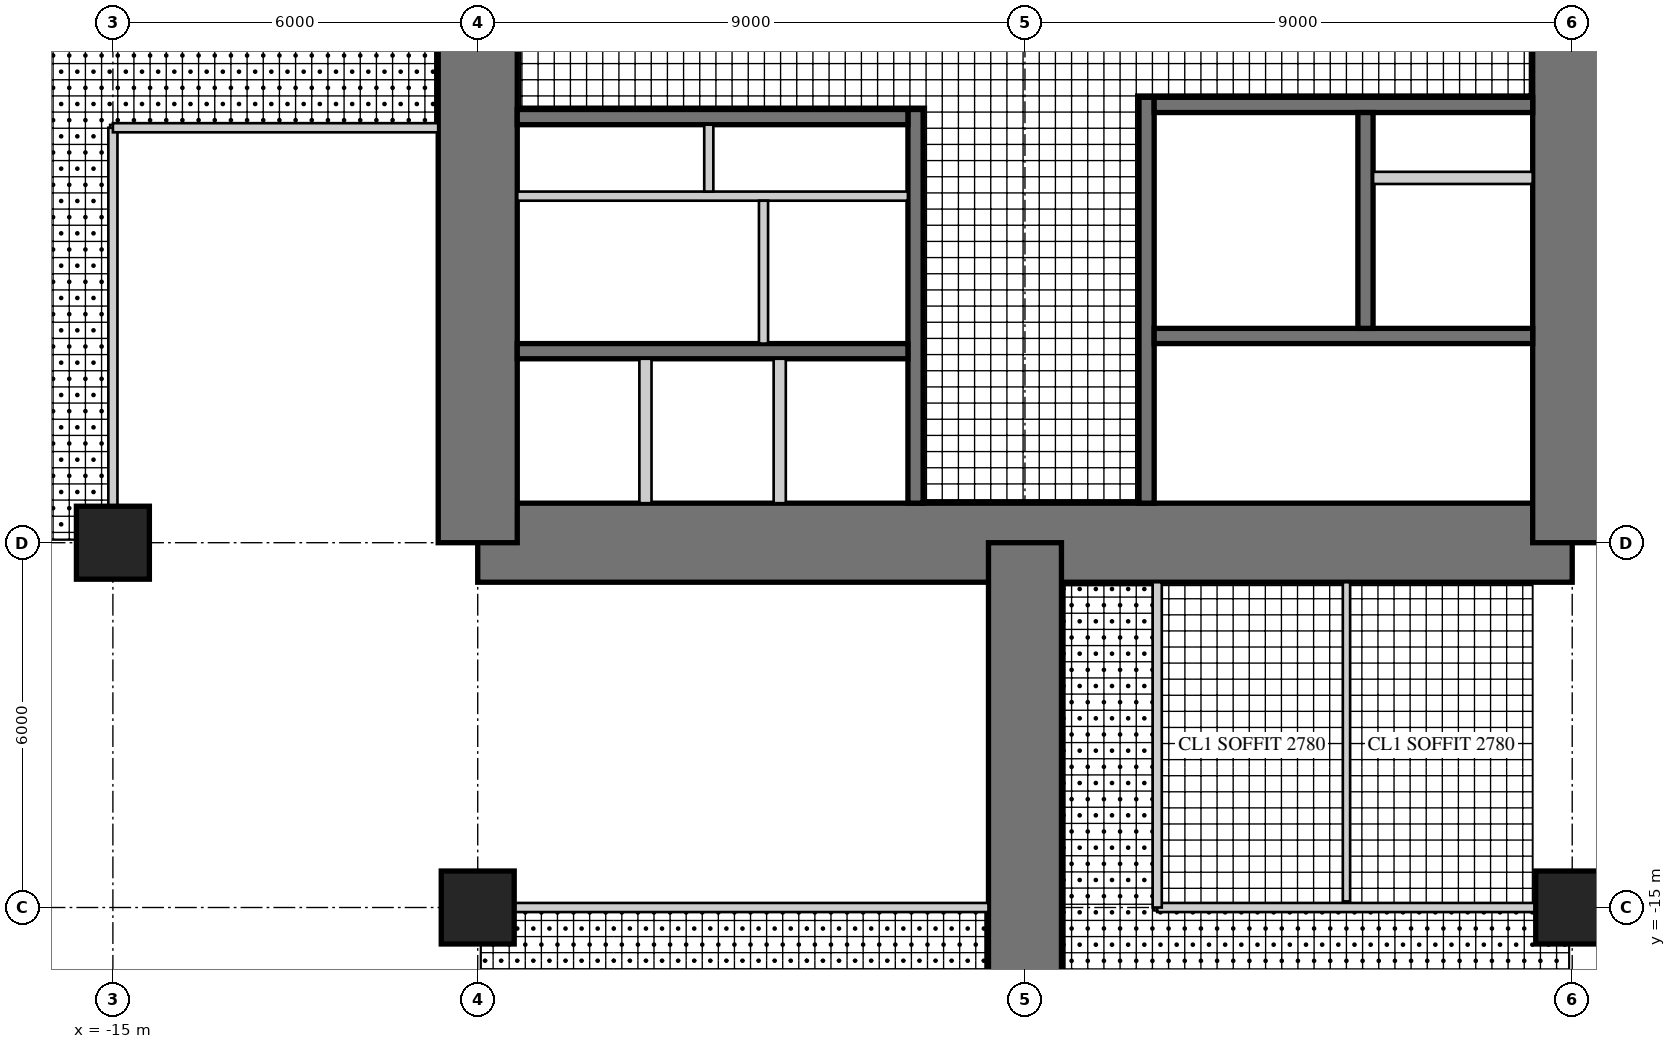
"""IFC4 building model, lengths in metres.
Left out: names, types, materials, properties, quantities, classifications, styles, units other than length and angle.
Written with IfcOpenShell. Run it as: python <this file> out.ifc"""

import sys

from ifc_helpers import new_model, si_unit, direction, frame, frame_2d, origin, origin_2d, place, context, subcontext, project, spatial, rectangle, extrude, element, fill, save


model = new_model("IFC4")
c1 = context("Model", 3, precision=1e-05, world=origin(), true_north=direction((0.0, 1.0)))
c2 = subcontext(c1, "Body", "Model", "MODEL_VIEW")
j1 = project(units=[si_unit("LENGTHUNIT", "METRE"), si_unit("PLANEANGLEUNIT", "RADIAN")], contexts=[c1])
p1 = place(None, origin())
s1 = spatial("IfcSite", under=j1, at=p1, CompositionType="ELEMENT")
p2 = place(p1, origin())
s2 = spatial("IfcBuilding", under=s1, at=p2, CompositionType="ELEMENT")
p3 = place(p2, frame((0.0, 0.0, 71.5)))
s3 = spatial("IfcBuildingStorey", under=s2, at=p3, CompositionType="ELEMENT", Elevation=71.5)
p4 = place(p3, frame((-9.0, -9.0, 0.0), z_axis=(0.0, 0.0, 1.0), x_axis=(1.0, 0.0, 0.0)))
e1 = element("IfcWall", 1, at=p4, inside=s3, PredefinedType="SHEAR", context=c2, shape_type="SweptSolid", body=[
    extrude(rectangle(XDim=18.0, YDim=1.3, at=frame_2d((9.0, 0.0))), origin(), (0.0, 0.0, 1.0), 4.0),
])
p5 = place(p4, frame((9.8, 0.0, 0.0)))
e2 = element("IfcOpeningElement", 2, at=p5, cuts=e1, PredefinedType="OPENING", context=c2, shape_type="SweptSolid", body=[
    extrude(rectangle(XDim=1.0, YDim=2.4, at=frame_2d((0.5, 1.2))), frame((0.0, 0.66, 0.0), z_axis=(0.0, -1.0, 0.0), x_axis=(1.0, 0.0, 0.0)), (0.0, 0.0, 1.0), 1.32),
])
p6 = place(p3, frame((9.0, -9.0, 0.0), z_axis=(0.0, 0.0, 1.0), x_axis=(0.0, 1.0, 0.0)))
e3 = element("IfcWall", 3, at=p6, inside=s3, PredefinedType="SHEAR", context=c2, shape_type="SweptSolid", body=[
    extrude(rectangle(XDim=18.0, YDim=1.3, at=frame_2d((9.0, 0.0))), origin(), (0.0, 0.0, 1.0), 4.0),
])
p7 = place(p6, frame((9.8, 0.0, 0.0)))
e4 = element("IfcOpeningElement", 4, at=p7, cuts=e3, PredefinedType="OPENING", context=c2, shape_type="SweptSolid", body=[
    extrude(rectangle(XDim=1.0, YDim=2.4, at=frame_2d((0.5, 1.2))), frame((0.0, 0.66, 0.0), z_axis=(0.0, -1.0, 0.0), x_axis=(1.0, 0.0, 0.0)), (0.0, 0.0, 1.0), 1.32),
])
p8 = place(p3, frame((-9.0, 9.0, 0.0), z_axis=(0.0, 0.0, 1.0), x_axis=(0.0, -1.0, 0.0)))
e5 = element("IfcWall", 5, at=p8, inside=s3, PredefinedType="SHEAR", context=c2, shape_type="SweptSolid", body=[
    extrude(rectangle(XDim=18.0, YDim=1.3, at=frame_2d((9.0, 0.0))), origin(), (0.0, 0.0, 1.0), 4.0),
])
p9 = place(p8, frame((9.8, 0.0, 0.0)))
e6 = element("IfcOpeningElement", 6, at=p9, cuts=e5, PredefinedType="OPENING", context=c2, shape_type="SweptSolid", body=[
    extrude(rectangle(XDim=1.0, YDim=2.4, at=frame_2d((0.5, 1.2))), frame((0.0, 0.66, 0.0), z_axis=(0.0, -1.0, 0.0), x_axis=(1.0, 0.0, 0.0)), (0.0, 0.0, 1.0), 1.32),
])
p10 = place(p3, frame((-1.8, -1.875, 0.0), z_axis=(0.0, 0.0, 1.0), x_axis=(0.0, -1.0, 0.0)))
e7 = element("IfcWall", 7, at=p10, inside=s3, PredefinedType="SHEAR", context=c2, shape_type="SweptSolid", body=[
    extrude(rectangle(XDim=6.475, YDim=0.25, at=frame_2d((3.238, 0.0))), origin(), (0.0, 0.0, 1.0), 4.0),
])
p11 = place(p10, frame((1.875, 0.0, 0.0)))
e8 = element("IfcOpeningElement", 8, at=p11, cuts=e7, PredefinedType="OPENING", context=c2, shape_type="SweptSolid", body=[
    extrude(rectangle(XDim=1.6, YDim=2.4, at=frame_2d((0.8, 1.2))), frame((0.0, 0.135, 0.0), z_axis=(0.0, -1.0, 0.0), x_axis=(1.0, 0.0, 0.0)), (0.0, 0.0, 1.0), 0.27),
])
for number, where, z_axis, x_axis in (
    (9, (-1.925, -2.0, 0.0), (0.0, 0.0, 1.0), (-1.0, 0.0, 0.0)),
    (10, (-1.925, -5.85, 0.0), (0.0, 0.0, 1.0), (-1.0, 0.0, 0.0)),
):
    element("IfcWall", number, at=place(p3, frame(where, z_axis=z_axis, x_axis=x_axis)), inside=s3, PredefinedType="SHEAR", context=c2, shape_type="SweptSolid", body=[
        extrude(rectangle(XDim=6.425, YDim=0.25, at=frame_2d((3.212, 0.0))), origin(), (0.0, 0.0, 1.0), 4.0),
    ])
p12 = place(p3, frame((-1.925, -3.3, 0.0), z_axis=(0.0, 0.0, 1.0), x_axis=(-1.0, 0.0, 0.0)))
e11 = element("IfcWall", 11, at=p12, inside=s3, PredefinedType="PARTITIONING", context=c2, shape_type="SweptSolid", body=[
    extrude(rectangle(XDim=6.425, YDim=0.15, at=frame_2d((3.212, 0.0))), origin(), (0.0, 0.0, 1.0), 4.0),
])
p13 = place(p12, frame((0.075, 0.0, 0.0)))
e12 = element("IfcOpeningElement", 12, at=p13, cuts=e11, PredefinedType="OPENING", context=c2, shape_type="SweptSolid", body=[
    extrude(rectangle(XDim=0.8, YDim=2.1, at=frame_2d((0.4, 1.05))), frame((0.0, 0.085, 0.0), z_axis=(0.0, -1.0, 0.0), x_axis=(1.0, 0.0, 0.0)), (0.0, 0.0, 1.0), 0.17),
])
p14 = place(p12, frame((3.675, 0.0, 0.0)))
e13 = element("IfcOpeningElement", 13, at=p14, cuts=e11, PredefinedType="OPENING", context=c2, shape_type="SweptSolid", body=[
    extrude(rectangle(XDim=0.8, YDim=2.1, at=frame_2d((0.4, 1.05))), frame((0.0, 0.085, 0.0), z_axis=(0.0, -1.0, 0.0), x_axis=(1.0, 0.0, 0.0)), (0.0, 0.0, 1.0), 0.17),
])
p15 = place(p3, frame((-5.2, -2.125, 0.0), z_axis=(0.0, 0.0, 1.0), x_axis=(0.0, -1.0, 0.0)))
e14 = element("IfcWall", 14, at=p15, inside=s3, PredefinedType="PARTITIONING", context=c2, shape_type="SweptSolid", body=[
    extrude(rectangle(XDim=1.1, YDim=0.15, at=frame_2d((0.55, 0.0))), origin(), (0.0, 0.0, 1.0), 4.0),
])
for number, where, z_axis, x_axis in (
    (15, (-4.033, -5.975, 0.0), (0.0, 0.0, 1.0), (0.0, -1.0, 0.0)),
    (16, (-6.242, -5.975, 0.0), (0.0, 0.0, 1.0), (0.0, -1.0, 0.0)),
):
    element("IfcWall", number, at=place(p3, frame(where, z_axis=z_axis, x_axis=x_axis)), inside=s3, PredefinedType="PARTITIONING", context=c2, shape_type="SweptSolid", body=[
        extrude(rectangle(XDim=2.375, YDim=0.2, at=frame_2d((1.188, 0.0))), origin(), (0.0, 0.0, 1.0), 4.0),
    ])
p16 = place(p3, frame((2.0, -1.675, 0.0), z_axis=(0.0, 0.0, 1.0), x_axis=(0.0, -1.0, 0.0)))
e17 = element("IfcWall", 17, at=p16, inside=s3, PredefinedType="SHEAR", context=c2, shape_type="SweptSolid", body=[
    extrude(rectangle(XDim=6.675, YDim=0.25, at=frame_2d((3.337, 0.0))), origin(), (0.0, 0.0, 1.0), 4.0),
])
p17 = place(p16, frame((0.725, 0.0, 0.0)))
e18 = element("IfcOpeningElement", 18, at=p17, cuts=e17, PredefinedType="OPENING", context=c2, shape_type="SweptSolid", body=[
    extrude(rectangle(XDim=1.0, YDim=2.1, at=frame_2d((0.5, 1.05))), frame((0.0, 0.135, 0.0), z_axis=(0.0, -1.0, 0.0), x_axis=(1.0, 0.0, 0.0)), (0.0, 0.0, 1.0), 0.27),
])
p18 = place(p3, frame((2.125, -1.8, 0.0), z_axis=(0.0, 0.0, 1.0), x_axis=(1.0, 0.0, 0.0)))
e19 = element("IfcWall", 19, at=p18, inside=s3, PredefinedType="SHEAR", context=c2, shape_type="SweptSolid", body=[
    extrude(rectangle(XDim=6.225, YDim=0.25, at=frame_2d((3.113, 0.0))), origin(), (0.0, 0.0, 1.0), 4.0),
])
p19 = place(p3, frame((2.125, -5.6, 0.0), z_axis=(0.0, 0.0, 1.0), x_axis=(1.0, 0.0, 0.0)))
e20 = element("IfcWall", 20, at=p19, inside=s3, PredefinedType="SHEAR", context=c2, shape_type="SweptSolid", body=[
    extrude(rectangle(XDim=6.225, YDim=0.25, at=frame_2d((3.113, 0.0))), origin(), (0.0, 0.0, 1.0), 4.0),
])
p20 = place(p19, frame((0.175, 0.0, 0.0)))
e21 = element("IfcOpeningElement", 21, at=p20, cuts=e20, PredefinedType="OPENING", context=c2, shape_type="SweptSolid", body=[
    extrude(rectangle(XDim=1.0, YDim=2.1, at=frame_2d((0.5, 1.05))), frame((0.0, 0.135, 0.0), z_axis=(0.0, -1.0, 0.0), x_axis=(1.0, 0.0, 0.0)), (0.0, 0.0, 1.0), 0.27),
])
p21 = place(p3, frame((5.6, -1.925, 0.0), z_axis=(0.0, 0.0, 1.0), x_axis=(0.0, -1.0, 0.0)))
e22 = element("IfcWall", 22, at=p21, inside=s3, PredefinedType="SHEAR", context=c2, shape_type="SweptSolid", body=[
    extrude(rectangle(XDim=3.55, YDim=0.25, at=frame_2d((1.775, 0.0))), origin(), (0.0, 0.0, 1.0), 4.0),
])
p22 = place(p21, frame((1.525, 0.0, 0.0)))
e23 = element("IfcOpeningElement", 23, at=p22, cuts=e22, PredefinedType="OPENING", context=c2, shape_type="SweptSolid", body=[
    extrude(rectangle(XDim=1.1, YDim=2.2, at=frame_2d((0.55, 1.1))), frame((0.0, 0.135, 0.0), z_axis=(0.0, -1.0, 0.0), x_axis=(1.0, 0.0, 0.0)), (0.0, 0.0, 1.0), 0.27),
])
p23 = place(p21, frame((0.075, 0.0, 0.0)))
e24 = element("IfcOpeningElement", 24, at=p23, cuts=e22, PredefinedType="OPENING", context=c2, shape_type="SweptSolid", body=[
    extrude(rectangle(XDim=0.8, YDim=2.1, at=frame_2d((0.4, 1.05))), frame((0.0, 0.135, 0.0), z_axis=(0.0, -1.0, 0.0), x_axis=(1.0, 0.0, 0.0)), (0.0, 0.0, 1.0), 0.27),
])
p24 = place(p3, frame((5.725, -3.0, 0.0), z_axis=(0.0, 0.0, 1.0), x_axis=(1.0, 0.0, 0.0)))
e25 = element("IfcWall", 25, at=p24, inside=s3, PredefinedType="PARTITIONING", context=c2, shape_type="SweptSolid", body=[
    extrude(rectangle(XDim=2.625, YDim=0.2, at=frame_2d((1.312, 0.0))), origin(), (0.0, 0.0, 1.0), 4.0),
])
p25 = place(p3, frame((0.0, -9.0, 0.0), z_axis=(0.0, 0.0, 1.0), x_axis=(0.0, -1.0, 0.0)))
e26 = element("IfcWall", 26, at=p25, inside=s3, PredefinedType="SHEAR", context=c2, shape_type="SweptSolid", body=[
    extrude(rectangle(XDim=18.0, YDim=1.2, at=frame_2d((9.0, 0.0))), origin(), (0.0, 0.0, 1.0), 4.0),
])
p26 = place(p25, frame((9.9, 0.0, 0.0)))
e27 = element("IfcOpeningElement", 27, at=p26, cuts=e26, PredefinedType="OPENING", context=c2, shape_type="SweptSolid", body=[
    extrude(rectangle(XDim=1.0, YDim=2.2, at=frame_2d((0.5, 1.1))), frame((0.0, 0.61, 0.0), z_axis=(0.0, -1.0, 0.0), x_axis=(1.0, 0.0, 0.0)), (0.0, 0.0, 1.0), 1.22),
])
for number, where, z_axis, x_axis in (
    (28, (-9.0, -15.0, 0.0), (0.0, 0.0, 1.0), (1.0, 0.0, 0.0)),
    (29, (9.0, -15.0, 0.0), (0.0, 0.0, 1.0), (1.0, 0.0, 0.0)),
    (30, (-15.0, -9.0, 0.0), (0.0, 0.0, 1.0), (1.0, 0.0, 0.0)),
):
    element("IfcColumn", number, at=place(p3, frame(where, z_axis=z_axis, x_axis=x_axis)), inside=s3, PredefinedType="COLUMN", context=c2, shape_type="SweptSolid", body=[
        extrude(rectangle(XDim=1.2, YDim=1.2, at=origin_2d()), origin(), (0.0, 0.0, 1.0), 4.0),
    ])
p27 = place(p3, frame((-4.3, -3.375, 0.0), z_axis=(0.0, 0.0, 1.0), x_axis=(0.0, -1.0, 0.0)))
e31 = element("IfcWall", 31, at=p27, inside=s3, PredefinedType="PARTITIONING", context=c2, shape_type="SweptSolid", body=[
    extrude(rectangle(XDim=2.35, YDim=0.15, at=frame_2d((1.175, 0.0))), origin(), (0.0, 0.0, 1.0), 3.8),
])
p28 = place(p27, frame((0.45, 0.0, 0.0)))
e32 = element("IfcOpeningElement", 32, at=p28, cuts=e31, PredefinedType="OPENING", context=c2, shape_type="SweptSolid", body=[
    extrude(rectangle(XDim=1.0, YDim=2.1, at=frame_2d((0.5, 1.05))), frame((0.0, 0.085, 0.0), z_axis=(0.0, -1.0, 0.0), x_axis=(1.0, 0.0, 0.0)), (0.0, 0.0, 1.0), 0.17),
])
p29 = place(p3, frame((2.175, -15.0, 0.0), z_axis=(0.0, 0.0, 1.0), x_axis=(1.0, 0.0, 0.0)))
e33 = element("IfcWall", 33, at=p29, inside=s3, PredefinedType="PARTITIONING", context=c2, shape_type="SweptSolid", body=[
    extrude(rectangle(XDim=6.225, YDim=0.15, at=frame_2d((3.112, 0.0))), origin(), (0.0, 0.0, 1.0), 2.95),
])
p30 = place(p29, frame((1.056, 0.0, 0.0)))
e34 = element("IfcOpeningElement", 34, at=p30, cuts=e33, PredefinedType="OPENING", context=c2, shape_type="SweptSolid", body=[
    extrude(rectangle(XDim=1.0, YDim=2.1, at=frame_2d((0.5, 1.05))), frame((0.0, 0.085, 0.0), z_axis=(0.0, -1.0, 0.0), x_axis=(1.0, 0.0, 0.0)), (0.0, 0.0, 1.0), 0.17),
])
p31 = place(p29, frame((4.169, 0.0, 0.0)))
e35 = element("IfcOpeningElement", 35, at=p31, cuts=e33, PredefinedType="OPENING", context=c2, shape_type="SweptSolid", body=[
    extrude(rectangle(XDim=1.0, YDim=2.1, at=frame_2d((0.5, 1.05))), frame((0.0, 0.085, 0.0), z_axis=(0.0, -1.0, 0.0), x_axis=(1.0, 0.0, 0.0)), (0.0, 0.0, 1.0), 0.17),
])
p32 = place(p3, frame((2.175, -9.65, 0.0), z_axis=(0.0, 0.0, 1.0), x_axis=(0.0, -1.0, 0.0)))
e36 = element("IfcWall", 36, at=p32, inside=s3, PredefinedType="PARTITIONING", context=c2, shape_type="SweptSolid", body=[
    extrude(rectangle(XDim=5.35, YDim=0.15, at=frame_2d((2.675, 0.0))), origin(), (0.0, 0.0, 1.0), 3.8),
])
p33 = place(p3, frame((5.288, -9.65, 0.0), z_axis=(0.0, 0.0, 1.0), x_axis=(0.0, -1.0, 0.0)))
e37 = element("IfcWall", 37, at=p33, inside=s3, PredefinedType="PLUMBINGWALL", context=c2, shape_type="SweptSolid", body=[
    extrude(rectangle(XDim=5.25, YDim=0.12, at=frame_2d((2.625, 0.0))), origin(), (0.0, 0.0, 1.0), 3.8),
])
p34 = place(p3, frame((-8.4, -15.0, 0.0), z_axis=(0.0, 0.0, 1.0), x_axis=(1.0, 0.0, 0.0)))
e38 = element("IfcWall", 38, at=p34, inside=s3, PredefinedType="PARTITIONING", context=c2, shape_type="SweptSolid", body=[
    extrude(rectangle(XDim=7.8, YDim=0.15, at=frame_2d((3.9, 0.0))), origin(), (0.0, 0.0, 1.0), 2.95),
])
p35 = place(p34, frame((3.4, 0.0, 0.0)))
e39 = element("IfcOpeningElement", 39, at=p35, cuts=e38, PredefinedType="OPENING", context=c2, shape_type="SweptSolid", body=[
    extrude(rectangle(XDim=1.0, YDim=2.1, at=frame_2d((0.5, 1.05))), frame((0.0, 0.085, 0.0), z_axis=(0.0, -1.0, 0.0), x_axis=(1.0, 0.0, 0.0)), (0.0, 0.0, 1.0), 0.17),
])
p36 = place(p3, frame((-15.0, -2.175, 0.0), z_axis=(0.0, 0.0, 1.0), x_axis=(0.0, -1.0, 0.0)))
e40 = element("IfcWall", 40, at=p36, inside=s3, PredefinedType="PARTITIONING", context=c2, shape_type="SweptSolid", body=[
    extrude(rectangle(XDim=6.225, YDim=0.15, at=frame_2d((3.112, 0.0))), origin(), (0.0, 0.0, 1.0), 2.95),
])
p37 = place(p36, frame((2.613, 0.0, 0.0)))
e41 = element("IfcOpeningElement", 41, at=p37, cuts=e40, PredefinedType="OPENING", context=c2, shape_type="SweptSolid", body=[
    extrude(rectangle(XDim=1.0, YDim=2.1, at=frame_2d((0.5, 1.05))), frame((0.0, 0.085, 0.0), z_axis=(0.0, -1.0, 0.0), x_axis=(1.0, 0.0, 0.0)), (0.0, 0.0, 1.0), 0.17),
])
p38 = place(p3, frame((-9.65, -2.175, 0.0), z_axis=(0.0, 0.0, 1.0), x_axis=(-1.0, 0.0, 0.0)))
e42 = element("IfcWall", 42, at=p38, inside=s3, PredefinedType="PARTITIONING", context=c2, shape_type="SweptSolid", body=[
    extrude(rectangle(XDim=5.35, YDim=0.15, at=frame_2d((2.675, 0.0))), origin(), (0.0, 0.0, 1.0), 3.8),
])
p39 = place(p28, origin())
e43 = element("IfcDoor", 43, at=p39, inside=s3, OperationType="SINGLE_SWING_LEFT", PredefinedType="DOOR", context=c2, shape_type="SweptSolid", body=[
    extrude(rectangle(XDim=1.0, YDim=2.1, at=frame_2d((0.5, 1.05))), frame((0.0, 0.025, 0.0), z_axis=(0.0, -1.0, 0.0), x_axis=(1.0, 0.0, 0.0)), (0.0, 0.0, 1.0), 0.05),
])
fill(e32, e43)
p40 = place(p30, origin())
e44 = element("IfcDoor", 44, at=p40, inside=s3, OperationType="SINGLE_SWING_LEFT", PredefinedType="DOOR", context=c2, shape_type="SweptSolid", body=[
    extrude(rectangle(XDim=1.0, YDim=2.1, at=frame_2d((0.5, 1.05))), frame((0.0, 0.025, 0.0), z_axis=(0.0, -1.0, 0.0), x_axis=(1.0, 0.0, 0.0)), (0.0, 0.0, 1.0), 0.05),
])
fill(e34, e44)
p41 = place(p31, origin())
e45 = element("IfcDoor", 45, at=p41, inside=s3, OperationType="SINGLE_SWING_LEFT", PredefinedType="DOOR", context=c2, shape_type="SweptSolid", body=[
    extrude(rectangle(XDim=1.0, YDim=2.1, at=frame_2d((0.5, 1.05))), frame((0.0, 0.025, 0.0), z_axis=(0.0, -1.0, 0.0), x_axis=(1.0, 0.0, 0.0)), (0.0, 0.0, 1.0), 0.05),
])
fill(e35, e45)
p42 = place(p35, origin())
e46 = element("IfcDoor", 46, at=p42, inside=s3, OperationType="SINGLE_SWING_RIGHT", PredefinedType="DOOR", context=c2, shape_type="SweptSolid", body=[
    extrude(rectangle(XDim=1.0, YDim=2.1, at=frame_2d((0.5, 1.05))), frame((0.0, 0.025, 0.0), z_axis=(0.0, -1.0, 0.0), x_axis=(1.0, 0.0, 0.0)), (0.0, 0.0, 1.0), 0.05),
])
fill(e39, e46)
p43 = place(p37, origin())
e47 = element("IfcDoor", 47, at=p43, inside=s3, OperationType="SINGLE_SWING_LEFT", PredefinedType="DOOR", context=c2, shape_type="SweptSolid", body=[
    extrude(rectangle(XDim=1.0, YDim=2.1, at=frame_2d((0.5, 1.05))), frame((0.0, 0.025, 0.0), z_axis=(0.0, -1.0, 0.0), x_axis=(1.0, 0.0, 0.0)), (0.0, 0.0, 1.0), 0.05),
])
fill(e41, e47)
p44 = place(p5, frame((1.0, 0.0, 0.0), z_axis=(0.0, 0.0, 1.0), x_axis=(-1.0, 0.0, 0.0)))
e48 = element("IfcDoor", 48, at=p44, inside=s3, OperationType="SINGLE_SWING_RIGHT", PredefinedType="DOOR", context=c2, shape_type="SweptSolid", body=[
    extrude(rectangle(XDim=1.0, YDim=2.4, at=frame_2d((0.5, 1.2))), frame((0.0, -0.005, 0.0), z_axis=(0.0, -1.0, 0.0), x_axis=(1.0, 0.0, 0.0)), (0.0, 0.0, 1.0), 0.05),
])
fill(e2, e48)
p45 = place(p9, frame((1.0, 0.0, 0.0), z_axis=(0.0, 0.0, 1.0), x_axis=(-1.0, 0.0, 0.0)))
e49 = element("IfcDoor", 49, at=p45, inside=s3, OperationType="SINGLE_SWING_RIGHT", PredefinedType="DOOR", context=c2, shape_type="SweptSolid", body=[
    extrude(rectangle(XDim=1.0, YDim=2.4, at=frame_2d((0.5, 1.2))), frame((0.0, -0.005, 0.0), z_axis=(0.0, -1.0, 0.0), x_axis=(1.0, 0.0, 0.0)), (0.0, 0.0, 1.0), 0.05),
])
fill(e6, e49)
p46 = place(p11, frame((1.6, 0.0, 0.0), z_axis=(0.0, 0.0, 1.0), x_axis=(-1.0, 0.0, 0.0)))
e50 = element("IfcDoor", 50, at=p46, inside=s3, OperationType="DOUBLE_DOOR_SINGLE_SWING", PredefinedType="DOOR", context=c2, shape_type="SweptSolid", body=[
    extrude(rectangle(XDim=1.6, YDim=2.4, at=frame_2d((0.8, 1.2))), frame((0.0, 0.025, 0.0), z_axis=(0.0, -1.0, 0.0), x_axis=(1.0, 0.0, 0.0)), (0.0, 0.0, 1.0), 0.05),
])
fill(e8, e50)
p47 = place(p13, frame((0.8, 0.0, 0.0), z_axis=(0.0, 0.0, 1.0), x_axis=(-1.0, 0.0, 0.0)))
e51 = element("IfcDoor", 51, at=p47, inside=s3, OperationType="SINGLE_SWING_RIGHT", PredefinedType="DOOR", context=c2, shape_type="SweptSolid", body=[
    extrude(rectangle(XDim=0.8, YDim=2.1, at=frame_2d((0.4, 1.05))), frame((0.0, 0.025, 0.0), z_axis=(0.0, -1.0, 0.0), x_axis=(1.0, 0.0, 0.0)), (0.0, 0.0, 1.0), 0.05),
])
fill(e12, e51)
p48 = place(p14, frame((0.8, 0.0, 0.0), z_axis=(0.0, 0.0, 1.0), x_axis=(-1.0, 0.0, 0.0)))
e52 = element("IfcDoor", 52, at=p48, inside=s3, OperationType="SINGLE_SWING_RIGHT", PredefinedType="DOOR", context=c2, shape_type="SweptSolid", body=[
    extrude(rectangle(XDim=0.8, YDim=2.1, at=frame_2d((0.4, 1.05))), frame((0.0, 0.025, 0.0), z_axis=(0.0, -1.0, 0.0), x_axis=(1.0, 0.0, 0.0)), (0.0, 0.0, 1.0), 0.05),
])
fill(e13, e52)
p49 = place(p17, origin())
e53 = element("IfcDoor", 53, at=p49, inside=s3, OperationType="SINGLE_SWING_LEFT", PredefinedType="DOOR", context=c2, shape_type="SweptSolid", body=[
    extrude(rectangle(XDim=1.0, YDim=2.1, at=frame_2d((0.5, 1.05))), frame((0.0, 0.025, 0.0), z_axis=(0.0, -1.0, 0.0), x_axis=(1.0, 0.0, 0.0)), (0.0, 0.0, 1.0), 0.05),
])
fill(e18, e53)
p50 = place(p20, frame((1.0, 0.0, 0.0), z_axis=(0.0, 0.0, 1.0), x_axis=(-1.0, 0.0, 0.0)))
e54 = element("IfcDoor", 54, at=p50, inside=s3, OperationType="SINGLE_SWING_RIGHT", PredefinedType="DOOR", context=c2, shape_type="SweptSolid", body=[
    extrude(rectangle(XDim=1.0, YDim=2.1, at=frame_2d((0.5, 1.05))), frame((0.0, 0.025, 0.0), z_axis=(0.0, -1.0, 0.0), x_axis=(1.0, 0.0, 0.0)), (0.0, 0.0, 1.0), 0.05),
])
fill(e21, e54)
p51 = place(p22, origin())
e55 = element("IfcDoor", 55, at=p51, inside=s3, OperationType="DOUBLE_DOOR_SLIDING", PredefinedType="DOOR", context=c2, shape_type="SweptSolid", body=[
    extrude(rectangle(XDim=1.1, YDim=2.2, at=frame_2d((0.55, 1.1))), frame((0.0, 0.025, 0.0), z_axis=(0.0, -1.0, 0.0), x_axis=(1.0, 0.0, 0.0)), (0.0, 0.0, 1.0), 0.05),
])
fill(e23, e55)
p52 = place(p23, origin())
e56 = element("IfcDoor", 56, at=p52, inside=s3, OperationType="SINGLE_SWING_LEFT", PredefinedType="DOOR", context=c2, shape_type="SweptSolid", body=[
    extrude(rectangle(XDim=0.8, YDim=2.1, at=frame_2d((0.4, 1.05))), frame((0.0, 0.025, 0.0), z_axis=(0.0, -1.0, 0.0), x_axis=(1.0, 0.0, 0.0)), (0.0, 0.0, 1.0), 0.05),
])
fill(e24, e56)
save(model, sys.argv[1])
